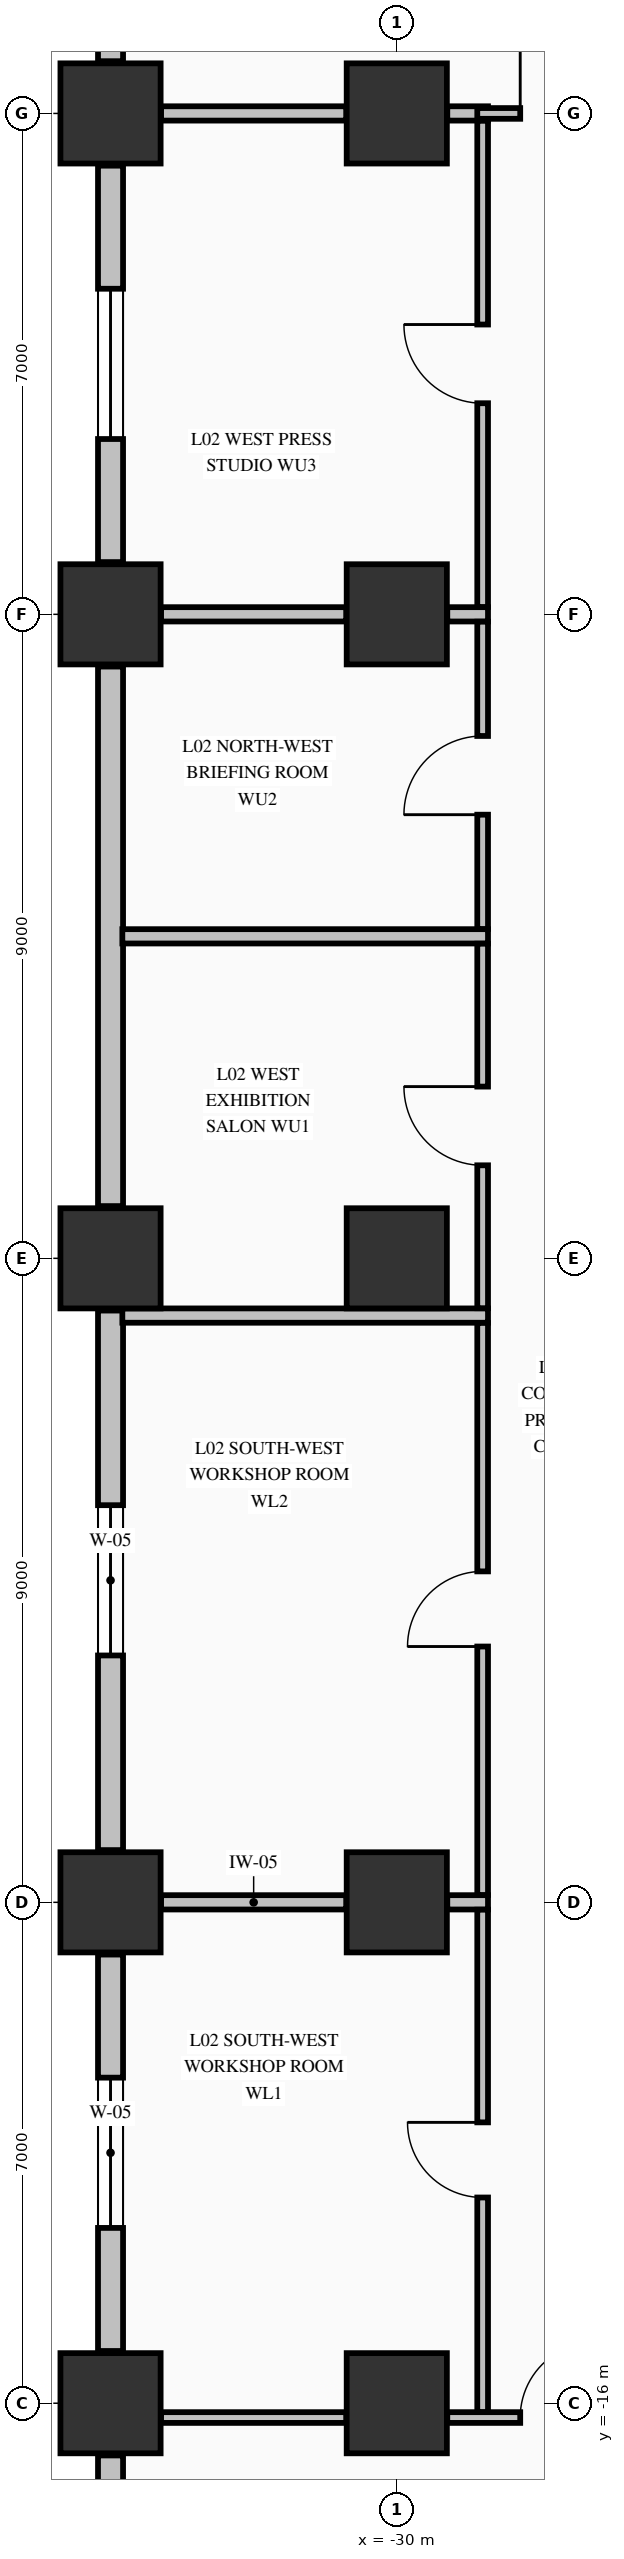
"""IFC4 building model, lengths in metres.
Left out: names, types, materials, properties, quantities, classifications, styles, units other than length and angle.
Written with IfcOpenShell. Run it as: python <this file> out.ifc"""

import sys

from ifc_helpers import new_model, si_unit, direction, frame, frame_2d, origin, origin_2d, place, context, subcontext, project, spatial, rectangle, extrude, element, fill, save


model = new_model("IFC4")
c1 = context("Model", 3, precision=1e-05, world=origin(), true_north=direction((0.0, 1.0)))
c2 = subcontext(c1, "Body", "Model", "MODEL_VIEW")
j1 = project(units=[si_unit("LENGTHUNIT", "METRE"), si_unit("PLANEANGLEUNIT", "RADIAN")], contexts=[c1])
p1 = place(None, origin())
s1 = spatial("IfcSite", under=j1, at=p1, CompositionType="ELEMENT")
p2 = place(p1, origin())
s2 = spatial("IfcBuilding", under=s1, at=p2, CompositionType="ELEMENT")
p3 = place(p2, frame((0.0, 0.0, 10.88)))
s3 = spatial("IfcBuildingStorey", under=s2, at=p3, CompositionType="ELEMENT", Elevation=10.88)
for number, where, z_axis, x_axis in (
    (1, (-34.0, -16.0, 0.0), (0.0, 0.0, 1.0), (1.0, 0.0, 0.0)),
    (2, (-34.0, -9.0, 0.0), (0.0, 0.0, 1.0), (1.0, 0.0, 0.0)),
    (3, (-34.0, 0.0, 0.0), (0.0, 0.0, 1.0), (1.0, 0.0, 0.0)),
    (4, (-34.0, 9.0, 0.0), (0.0, 0.0, 1.0), (1.0, 0.0, 0.0)),
    (5, (-34.0, 16.0, 0.0), (0.0, 0.0, 1.0), (1.0, 0.0, 0.0)),
    (6, (-30.0, -16.0, 0.0), (0.0, 0.0, 1.0), (1.0, 0.0, 0.0)),
    (7, (-30.0, -9.0, 0.0), (0.0, 0.0, 1.0), (1.0, 0.0, 0.0)),
    (8, (-30.0, 0.0, 0.0), (0.0, 0.0, 1.0), (1.0, 0.0, 0.0)),
    (9, (-30.0, 9.0, 0.0), (0.0, 0.0, 1.0), (1.0, 0.0, 0.0)),
    (10, (-30.0, 16.0, 0.0), (0.0, 0.0, 1.0), (1.0, 0.0, 0.0)),
):
    element("IfcColumn", number, at=place(p3, frame(where, z_axis=z_axis, x_axis=x_axis)), inside=s3, PredefinedType="COLUMN", context=c2, shape_type="SweptSolid", body=[
        extrude(rectangle(XDim=1.4, YDim=1.4, at=origin_2d()), origin(), (0.0, 0.0, 1.0), 5.09),
    ])
p4 = place(p3, frame((-34.0, -21.27, 0.0), z_axis=(0.0, 0.0, 1.0), x_axis=(0.0, 1.0, 0.0)))
e11 = element("IfcWall", 11, at=p4, inside=s3, PredefinedType="STANDARD", context=c2, shape_type="SweptSolid", body=[
    extrude(rectangle(XDim=4.54, YDim=0.35, at=frame_2d((2.27, 0.0))), origin(), (0.0, 0.0, 1.0), 5.09),
])
p5 = place(p3, frame((-34.0, -15.27, 0.0), z_axis=(0.0, 0.0, 1.0), x_axis=(0.0, 1.0, 0.0)))
e12 = element("IfcWall", 12, at=p5, inside=s3, PredefinedType="STANDARD", context=c2, shape_type="SweptSolid", body=[
    extrude(rectangle(XDim=5.54, YDim=0.35, at=frame_2d((2.77, 0.0))), origin(), (0.0, 0.0, 1.0), 4.482),
])
p6 = place(p5, frame((1.72, 0.0, 0.75)))
e13 = element("IfcOpeningElement", 13, at=p6, cuts=e12, PredefinedType="OPENING", context=c2, shape_type="SweptSolid", body=[
    extrude(rectangle(XDim=2.1, YDim=1.75, at=frame_2d((1.05, 0.875))), frame((0.0, 0.185, 0.0), z_axis=(0.0, -1.0, 0.0), x_axis=(1.0, 0.0, 0.0)), (0.0, 0.0, 1.0), 0.37),
])
p7 = place(p3, frame((-34.0, -8.27, 0.0), z_axis=(0.0, 0.0, 1.0), x_axis=(0.0, 1.0, 0.0)))
e14 = element("IfcWall", 14, at=p7, inside=s3, PredefinedType="STANDARD", context=c2, shape_type="SweptSolid", body=[
    extrude(rectangle(XDim=7.54, YDim=0.35, at=frame_2d((3.77, 0.0))), origin(), (0.0, 0.0, 1.0), 4.482),
])
p8 = place(p7, frame((2.72, 0.0, 0.75)))
e15 = element("IfcOpeningElement", 15, at=p8, cuts=e14, PredefinedType="OPENING", context=c2, shape_type="SweptSolid", body=[
    extrude(rectangle(XDim=2.1, YDim=1.75, at=frame_2d((1.05, 0.875))), frame((0.0, 0.185, 0.0), z_axis=(0.0, -1.0, 0.0), x_axis=(1.0, 0.0, 0.0)), (0.0, 0.0, 1.0), 0.37),
])
p9 = place(p3, frame((-34.0, 0.73, 0.0), z_axis=(0.0, 0.0, 1.0), x_axis=(0.0, 1.0, 0.0)))
e16 = element("IfcWall", 16, at=p9, inside=s3, PredefinedType="STANDARD", context=c2, shape_type="SweptSolid", body=[
    extrude(rectangle(XDim=7.54, YDim=0.35, at=frame_2d((3.77, 0.0))), origin(), (0.0, 0.0, 1.0), 4.482),
])
p10 = place(p3, frame((-34.0, 9.73, 0.0), z_axis=(0.0, 0.0, 1.0), x_axis=(0.0, 1.0, 0.0)))
e17 = element("IfcWall", 17, at=p10, inside=s3, PredefinedType="STANDARD", context=c2, shape_type="SweptSolid", body=[
    extrude(rectangle(XDim=5.54, YDim=0.35, at=frame_2d((2.77, 0.0))), origin(), (0.0, 0.0, 1.0), 4.482),
])
p11 = place(p10, frame((1.72, 0.0, 0.75)))
e18 = element("IfcOpeningElement", 18, at=p11, cuts=e17, PredefinedType="OPENING", context=c2, shape_type="SweptSolid", body=[
    extrude(rectangle(XDim=2.1, YDim=1.75, at=frame_2d((1.05, 0.875))), frame((0.0, 0.185, 0.0), z_axis=(0.0, -1.0, 0.0), x_axis=(1.0, 0.0, 0.0)), (0.0, 0.0, 1.0), 0.37),
])
p12 = place(p3, frame((-34.0, 16.73, 0.0), z_axis=(0.0, 0.0, 1.0), x_axis=(0.0, 1.0, 0.0)))
e19 = element("IfcWall", 19, at=p12, inside=s3, PredefinedType="STANDARD", context=c2, shape_type="SweptSolid", body=[
    extrude(rectangle(XDim=4.54, YDim=0.35, at=frame_2d((2.27, 0.0))), origin(), (0.0, 0.0, 1.0), 4.482),
])
p13 = place(p3, frame((-33.294, -16.2, 0.0), z_axis=(0.0, 0.0, 1.0), x_axis=(1.0, 0.0, 0.0)))
e20 = element("IfcWall", 20, at=p13, inside=s3, PredefinedType="PARTITIONING", context=c2, shape_type="SweptSolid", body=[
    extrude(rectangle(XDim=2.588, YDim=0.15, at=frame_2d((1.294, 0.0))), origin(), (0.0, 0.0, 1.0), 4.132),
])
p14 = place(p3, frame((-29.294, -16.2, 0.0), z_axis=(0.0, 0.0, 1.0), x_axis=(1.0, 0.0, 0.0)))
e21 = element("IfcWall", 21, at=p14, inside=s3, PredefinedType="PARTITIONING", context=c2, shape_type="SweptSolid", body=[
    extrude(rectangle(XDim=2.588, YDim=0.15, at=frame_2d((1.294, 0.0))), origin(), (0.0, 0.0, 1.0), 4.132),
])
p15 = place(p14, frame((1.019, 0.0, 0.0)))
e22 = element("IfcOpeningElement", 22, at=p15, cuts=e21, PredefinedType="OPENING", context=c2, shape_type="SweptSolid", body=[
    extrude(rectangle(XDim=1.05, YDim=2.15, at=frame_2d((0.525, 1.075))), frame((0.0, 0.085, 0.0), z_axis=(0.0, -1.0, 0.0), x_axis=(1.0, 0.0, 0.0)), (0.0, 0.0, 1.0), 0.17),
])
p16 = place(p3, frame((-33.294, -9.0, 0.0), z_axis=(0.0, 0.0, 1.0), x_axis=(1.0, 0.0, 0.0)))
e23 = element("IfcWall", 23, at=p16, inside=s3, PredefinedType="PARTITIONING", context=c2, shape_type="SweptSolid", body=[
    extrude(rectangle(XDim=2.588, YDim=0.2, at=frame_2d((1.294, 0.0))), origin(), (0.0, 0.0, 1.0), 4.132),
])
p17 = place(p3, frame((-29.294, -9.0, 0.0), z_axis=(0.0, 0.0, 1.0), x_axis=(1.0, 0.0, 0.0)))
e24 = element("IfcWall", 24, at=p17, inside=s3, PredefinedType="PARTITIONING", context=c2, shape_type="SweptSolid", body=[
    extrude(rectangle(XDim=0.569, YDim=0.2, at=frame_2d((0.284, 0.0))), origin(), (0.0, 0.0, 1.0), 4.132),
])
p18 = place(p3, frame((-33.835, -0.8, 0.0), z_axis=(0.0, 0.0, 1.0), x_axis=(1.0, 0.0, 0.0)))
e25 = element("IfcWall", 25, at=p18, inside=s3, PredefinedType="PARTITIONING", context=c2, shape_type="SweptSolid", body=[
    extrude(rectangle(XDim=5.11, YDim=0.2, at=frame_2d((2.555, 0.0))), origin(), (0.0, 0.0, 1.0), 5.09),
])
p19 = place(p3, frame((-33.835, 4.5, 0.0), z_axis=(0.0, 0.0, 1.0), x_axis=(1.0, 0.0, 0.0)))
e26 = element("IfcWall", 26, at=p19, inside=s3, PredefinedType="PARTITIONING", context=c2, shape_type="SweptSolid", body=[
    extrude(rectangle(XDim=5.11, YDim=0.2, at=frame_2d((2.555, 0.0))), origin(), (0.0, 0.0, 1.0), 4.48),
])
p20 = place(p3, frame((-33.294, 9.0, 0.0), z_axis=(0.0, 0.0, 1.0), x_axis=(1.0, 0.0, 0.0)))
e27 = element("IfcWall", 27, at=p20, inside=s3, PredefinedType="PARTITIONING", context=c2, shape_type="SweptSolid", body=[
    extrude(rectangle(XDim=2.588, YDim=0.2, at=frame_2d((1.294, 0.0))), origin(), (0.0, 0.0, 1.0), 4.132),
])
p21 = place(p3, frame((-29.294, 9.0, 0.0), z_axis=(0.0, 0.0, 1.0), x_axis=(1.0, 0.0, 0.0)))
e28 = element("IfcWall", 28, at=p21, inside=s3, PredefinedType="PARTITIONING", context=c2, shape_type="SweptSolid", body=[
    extrude(rectangle(XDim=0.569, YDim=0.2, at=frame_2d((0.284, 0.0))), origin(), (0.0, 0.0, 1.0), 4.132),
])
p22 = place(p3, frame((-33.294, 16.0, 0.0), z_axis=(0.0, 0.0, 1.0), x_axis=(1.0, 0.0, 0.0)))
e29 = element("IfcWall", 29, at=p22, inside=s3, PredefinedType="PARTITIONING", context=c2, shape_type="SweptSolid", body=[
    extrude(rectangle(XDim=2.588, YDim=0.2, at=frame_2d((1.294, 0.0))), origin(), (0.0, 0.0, 1.0), 4.132),
])
p23 = place(p3, frame((-29.294, 16.0, 0.0), z_axis=(0.0, 0.0, 1.0), x_axis=(1.0, 0.0, 0.0)))
e30 = element("IfcWall", 30, at=p23, inside=s3, PredefinedType="PARTITIONING", context=c2, shape_type="SweptSolid", body=[
    extrude(rectangle(XDim=0.569, YDim=0.2, at=frame_2d((0.284, 0.0))), origin(), (0.0, 0.0, 1.0), 4.132),
])
p24 = place(p3, frame((-28.875, 16.0, 0.0), z_axis=(0.0, 0.0, 1.0), x_axis=(1.0, 0.0, 0.0)))
e31 = element("IfcWall", 31, at=p24, inside=s3, PredefinedType="PARTITIONING", context=c2, shape_type="SweptSolid", body=[
    extrude(rectangle(XDim=2.169, YDim=0.15, at=frame_2d((1.084, 0.0))), origin(), (0.0, 0.0, 1.0), 4.132),
])
p25 = place(p24, frame((0.6, 0.0, 0.0)))
e32 = element("IfcOpeningElement", 32, at=p25, cuts=e31, PredefinedType="OPENING", context=c2, shape_type="SweptSolid", body=[
    extrude(rectangle(XDim=1.05, YDim=2.15, at=frame_2d((0.525, 1.075))), frame((0.0, 0.085, 0.0), z_axis=(0.0, -1.0, 0.0), x_axis=(1.0, 0.0, 0.0)), (0.0, 0.0, 1.0), 0.17),
])
p26 = place(p3, frame((-28.8, -16.122, 0.0), z_axis=(0.0, 0.0, 1.0), x_axis=(0.0, 1.0, 0.0)))
e33 = element("IfcWall", 33, at=p26, inside=s3, PredefinedType="PARTITIONING", context=c2, shape_type="SweptSolid", body=[
    extrude(rectangle(XDim=7.019, YDim=0.15, at=frame_2d((3.51, 0.0))), origin(), (0.0, 0.0, 1.0), 5.09),
])
p27 = place(p26, frame((2.997, 0.0, 0.0)))
e34 = element("IfcOpeningElement", 34, at=p27, cuts=e33, PredefinedType="OPENING", context=c2, shape_type="SweptSolid", body=[
    extrude(rectangle(XDim=1.05, YDim=2.15, at=frame_2d((0.525, 1.075))), frame((0.0, 0.085, 0.0), z_axis=(0.0, -1.0, 0.0), x_axis=(1.0, 0.0, 0.0)), (0.0, 0.0, 1.0), 0.17),
])
p28 = place(p3, frame((-28.8, -8.897, 0.0), z_axis=(0.0, 0.0, 1.0), x_axis=(0.0, 1.0, 0.0)))
e35 = element("IfcWall", 35, at=p28, inside=s3, PredefinedType="PARTITIONING", context=c2, shape_type="SweptSolid", body=[
    extrude(rectangle(XDim=7.994, YDim=0.15, at=frame_2d((3.997, 0.0))), origin(), (0.0, 0.0, 1.0), 5.09),
])
p29 = place(p28, frame((3.472, 0.0, 0.0)))
e36 = element("IfcOpeningElement", 36, at=p29, cuts=e35, PredefinedType="OPENING", context=c2, shape_type="SweptSolid", body=[
    extrude(rectangle(XDim=1.05, YDim=2.15, at=frame_2d((0.525, 1.075))), frame((0.0, 0.085, 0.0), z_axis=(0.0, -1.0, 0.0), x_axis=(1.0, 0.0, 0.0)), (0.0, 0.0, 1.0), 0.17),
])
p30 = place(p3, frame((-28.8, -0.697, 0.0), z_axis=(0.0, 0.0, 1.0), x_axis=(0.0, 1.0, 0.0)))
e37 = element("IfcWall", 37, at=p30, inside=s3, PredefinedType="PARTITIONING", context=c2, shape_type="SweptSolid", body=[
    extrude(rectangle(XDim=5.094, YDim=0.15, at=frame_2d((2.547, 0.0))), origin(), (0.0, 0.0, 1.0), 5.09),
])
p31 = place(p30, frame((1.997, 0.0, 0.0)))
e38 = element("IfcOpeningElement", 38, at=p31, cuts=e37, PredefinedType="OPENING", context=c2, shape_type="SweptSolid", body=[
    extrude(rectangle(XDim=1.1, YDim=2.15, at=frame_2d((0.55, 1.075))), frame((0.0, 0.085, 0.0), z_axis=(0.0, -1.0, 0.0), x_axis=(1.0, 0.0, 0.0)), (0.0, 0.0, 1.0), 0.17),
])
p32 = place(p3, frame((-28.8, 4.603, 0.0), z_axis=(0.0, 0.0, 1.0), x_axis=(0.0, 1.0, 0.0)))
e39 = element("IfcWall", 39, at=p32, inside=s3, PredefinedType="PARTITIONING", context=c2, shape_type="SweptSolid", body=[
    extrude(rectangle(XDim=4.294, YDim=0.15, at=frame_2d((2.147, 0.0))), origin(), (0.0, 0.0, 1.0), 5.09),
])
p33 = place(p32, frame((1.597, 0.0, 0.0)))
e40 = element("IfcOpeningElement", 40, at=p33, cuts=e39, PredefinedType="OPENING", context=c2, shape_type="SweptSolid", body=[
    extrude(rectangle(XDim=1.1, YDim=2.15, at=frame_2d((0.55, 1.075))), frame((0.0, 0.085, 0.0), z_axis=(0.0, -1.0, 0.0), x_axis=(1.0, 0.0, 0.0)), (0.0, 0.0, 1.0), 0.17),
])
p34 = place(p3, frame((-28.8, 9.103, 0.0), z_axis=(0.0, 0.0, 1.0), x_axis=(0.0, 1.0, 0.0)))
e41 = element("IfcWall", 41, at=p34, inside=s3, PredefinedType="PARTITIONING", context=c2, shape_type="SweptSolid", body=[
    extrude(rectangle(XDim=6.794, YDim=0.15, at=frame_2d((3.397, 0.0))), origin(), (0.0, 0.0, 1.0), 5.09),
])
p35 = place(p34, frame((2.847, 0.0, 0.0)))
e42 = element("IfcOpeningElement", 42, at=p35, cuts=e41, PredefinedType="OPENING", context=c2, shape_type="SweptSolid", body=[
    extrude(rectangle(XDim=1.1, YDim=2.15, at=frame_2d((0.55, 1.075))), frame((0.0, 0.085, 0.0), z_axis=(0.0, -1.0, 0.0), x_axis=(1.0, 0.0, 0.0)), (0.0, 0.0, 1.0), 0.17),
])
p36 = place(p6, origin())
e43 = element("IfcWindow", 43, at=p36, inside=s3, PartitioningType="SINGLE_PANEL", PredefinedType="WINDOW", context=c2, shape_type="SweptSolid", body=[
    extrude(rectangle(XDim=2.1, YDim=1.75, at=frame_2d((1.05, 0.875))), frame((0.0, 0.03, 0.0), z_axis=(0.0, -1.0, 0.0), x_axis=(1.0, 0.0, 0.0)), (0.0, 0.0, 1.0), 0.06),
])
fill(e13, e43)
p37 = place(p8, origin())
e44 = element("IfcWindow", 44, at=p37, inside=s3, PartitioningType="SINGLE_PANEL", PredefinedType="WINDOW", context=c2, shape_type="SweptSolid", body=[
    extrude(rectangle(XDim=2.1, YDim=1.75, at=frame_2d((1.05, 0.875))), frame((0.0, 0.03, 0.0), z_axis=(0.0, -1.0, 0.0), x_axis=(1.0, 0.0, 0.0)), (0.0, 0.0, 1.0), 0.06),
])
fill(e15, e44)
p38 = place(p11, origin())
e45 = element("IfcWindow", 45, at=p38, inside=s3, PartitioningType="SINGLE_PANEL", PredefinedType="WINDOW", context=c2, shape_type="SweptSolid", body=[
    extrude(rectangle(XDim=2.1, YDim=1.75, at=frame_2d((1.05, 0.875))), frame((0.0, 0.03, 0.0), z_axis=(0.0, -1.0, 0.0), x_axis=(1.0, 0.0, 0.0)), (0.0, 0.0, 1.0), 0.06),
])
fill(e18, e45)
p39 = place(p15, origin())
e46 = element("IfcDoor", 46, at=p39, inside=s3, OperationType="SINGLE_SWING_RIGHT", PredefinedType="DOOR", context=c2, shape_type="SweptSolid", body=[
    extrude(rectangle(XDim=1.05, YDim=2.15, at=frame_2d((0.525, 1.075))), frame((0.0, 0.025, 0.0), z_axis=(0.0, -1.0, 0.0), x_axis=(1.0, 0.0, 0.0)), (0.0, 0.0, 1.0), 0.05),
])
fill(e22, e46)
p40 = place(p25, origin())
e47 = element("IfcDoor", 47, at=p40, inside=s3, OperationType="SINGLE_SWING_LEFT", PredefinedType="DOOR", context=c2, shape_type="SweptSolid", body=[
    extrude(rectangle(XDim=1.05, YDim=2.15, at=frame_2d((0.525, 1.075))), frame((0.0, 0.025, 0.0), z_axis=(0.0, -1.0, 0.0), x_axis=(1.0, 0.0, 0.0)), (0.0, 0.0, 1.0), 0.05),
])
fill(e32, e47)
p41 = place(p27, origin())
e48 = element("IfcDoor", 48, at=p41, inside=s3, OperationType="SINGLE_SWING_RIGHT", PredefinedType="DOOR", context=c2, shape_type="SweptSolid", body=[
    extrude(rectangle(XDim=1.05, YDim=2.15, at=frame_2d((0.525, 1.075))), frame((0.0, 0.025, 0.0), z_axis=(0.0, -1.0, 0.0), x_axis=(1.0, 0.0, 0.0)), (0.0, 0.0, 1.0), 0.05),
])
fill(e34, e48)
p42 = place(p29, origin())
e49 = element("IfcDoor", 49, at=p42, inside=s3, OperationType="SINGLE_SWING_LEFT", PredefinedType="DOOR", context=c2, shape_type="SweptSolid", body=[
    extrude(rectangle(XDim=1.05, YDim=2.15, at=frame_2d((0.525, 1.075))), frame((0.0, 0.025, 0.0), z_axis=(0.0, -1.0, 0.0), x_axis=(1.0, 0.0, 0.0)), (0.0, 0.0, 1.0), 0.05),
])
fill(e36, e49)
p43 = place(p31, origin())
e50 = element("IfcDoor", 50, at=p43, inside=s3, OperationType="SINGLE_SWING_RIGHT", PredefinedType="DOOR", context=c2, shape_type="SweptSolid", body=[
    extrude(rectangle(XDim=1.1, YDim=2.15, at=frame_2d((0.55, 1.075))), frame((0.0, 0.025, 0.0), z_axis=(0.0, -1.0, 0.0), x_axis=(1.0, 0.0, 0.0)), (0.0, 0.0, 1.0), 0.05),
])
fill(e38, e50)
p44 = place(p33, origin())
e51 = element("IfcDoor", 51, at=p44, inside=s3, OperationType="SINGLE_SWING_LEFT", PredefinedType="DOOR", context=c2, shape_type="SweptSolid", body=[
    extrude(rectangle(XDim=1.1, YDim=2.15, at=frame_2d((0.55, 1.075))), frame((0.0, 0.025, 0.0), z_axis=(0.0, -1.0, 0.0), x_axis=(1.0, 0.0, 0.0)), (0.0, 0.0, 1.0), 0.05),
])
fill(e40, e51)
p45 = place(p35, origin())
e52 = element("IfcDoor", 52, at=p45, inside=s3, OperationType="SINGLE_SWING_RIGHT", PredefinedType="DOOR", context=c2, shape_type="SweptSolid", body=[
    extrude(rectangle(XDim=1.1, YDim=2.15, at=frame_2d((0.55, 1.075))), frame((0.0, 0.025, 0.0), z_axis=(0.0, -1.0, 0.0), x_axis=(1.0, 0.0, 0.0)), (0.0, 0.0, 1.0), 0.05),
])
fill(e42, e52)
save(model, sys.argv[1])
